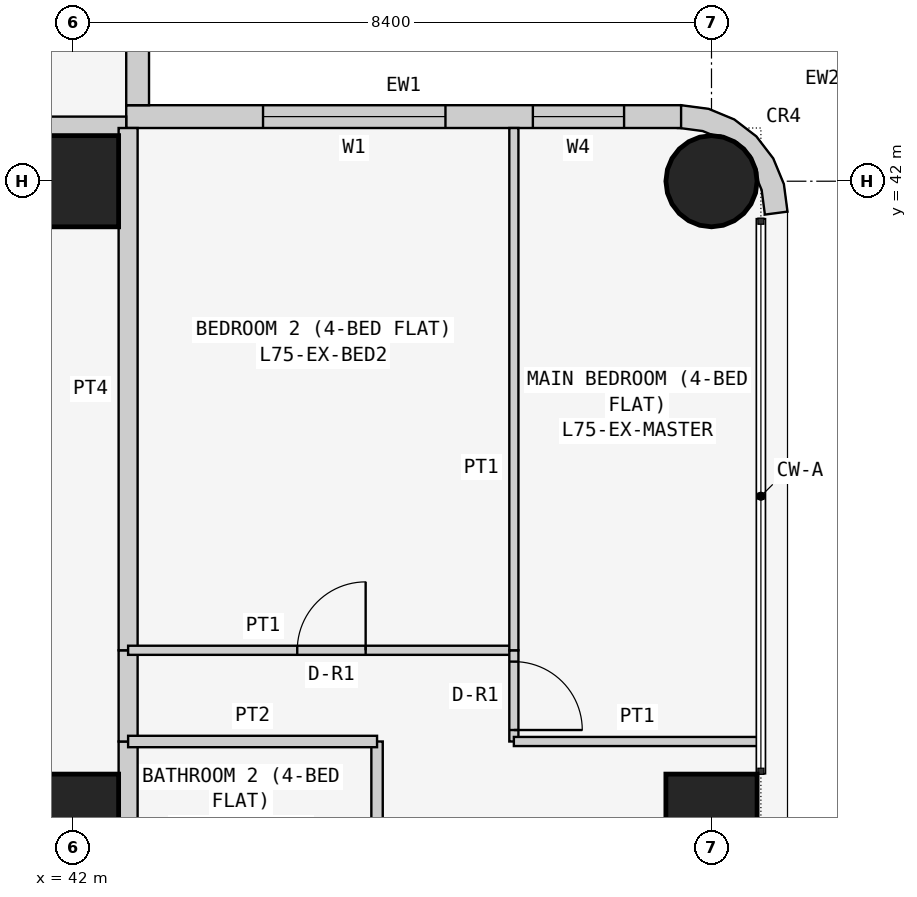
"""IFC4 building model, lengths in metres.
Left out: names, types, materials, properties, quantities, classifications, styles, units other than length and angle.
Written with IfcOpenShell. Run it as: python <this file> out.ifc"""

import sys

from ifc_helpers import new_model, si_unit, direction, frame, frame_2d, origin, origin_2d, place, context, subcontext, project, spatial, polyline, rectangle, circle, outline, extrude, element, fill, save


model = new_model("IFC4")
c1 = context("Model", 3, precision=1e-05, world=origin(), true_north=direction((0.0, 1.0)))
c2 = subcontext(c1, "Body", "Model", "MODEL_VIEW")
j1 = project(units=[si_unit("LENGTHUNIT", "METRE"), si_unit("PLANEANGLEUNIT", "RADIAN")], contexts=[c1])
p1 = place(None, origin())
s1 = spatial("IfcSite", under=j1, at=p1, CompositionType="ELEMENT")
p2 = place(p1, origin())
s2 = spatial("IfcBuilding", under=s1, at=p2, CompositionType="ELEMENT")
p3 = place(p2, frame((0.0, 0.0, 286.5)))
s3 = spatial("IfcBuildingStorey", under=s2, at=p3, CompositionType="ELEMENT", Elevation=286.5)
for number, where, z_axis, x_axis in (
    (1, (42.0, 33.6, 0.0), (0.0, 0.0, 1.0), (1.0, 0.0, 0.0)),
    (2, (42.0, 42.0, 0.0), (0.0, 0.0, 1.0), (1.0, 0.0, 0.0)),
    (3, (50.4, 33.6, 0.0), (0.0, 0.0, 1.0), (1.0, 0.0, 0.0)),
):
    element("IfcColumn", number, at=place(p3, frame(where, z_axis=z_axis, x_axis=x_axis)), inside=s3, PredefinedType="COLUMN", context=c2, shape_type="SweptSolid", body=[
        extrude(rectangle(XDim=1.2, YDim=1.2, at=origin_2d()), origin(), (0.0, 0.0, 1.0), 3.6),
    ])
p4 = place(p3, frame((50.4, 42.0, 0.0), z_axis=(0.0, 0.0, 1.0), x_axis=(1.0, 0.0, 0.0)))
e4 = element("IfcColumn", 4, at=p4, inside=s3, PredefinedType="COLUMN", context=c2, shape_type="SweptSolid", body=[
    extrude(circle(Radius=0.6, at=origin_2d()), origin(), (0.0, 0.0, 1.0), 3.6),
])
p5 = place(p3, frame((50.0, 42.85, 0.0), z_axis=(0.0, 0.0, 1.0), x_axis=(-1.0, 0.0, 0.0)))
e5 = element("IfcWall", 5, at=p5, inside=s3, PredefinedType="SOLIDWALL", context=c2, shape_type="SweptSolid", body=[
    extrude(rectangle(XDim=7.3, YDim=0.3, at=frame_2d((3.65, 0.0))), origin(), (0.0, 0.0, 1.0), 3.45),
])
p6 = place(p5, frame((3.1, 0.0, 0.9)))
e6 = element("IfcOpeningElement", 6, at=p6, cuts=e5, PredefinedType="OPENING", context=c2, shape_type="SweptSolid", body=[
    extrude(rectangle(XDim=2.4, YDim=1.5, at=frame_2d((1.2, 0.75))), frame((0.0, 0.16, 0.0), z_axis=(0.0, -1.0, 0.0), x_axis=(1.0, 0.0, 0.0)), (0.0, 0.0, 1.0), 0.32),
])
p7 = place(p5, frame((0.75, 0.0, 0.9)))
e7 = element("IfcOpeningElement", 7, at=p7, cuts=e5, PredefinedType="OPENING", context=c2, shape_type="SweptSolid", body=[
    extrude(rectangle(XDim=1.2, YDim=1.5, at=frame_2d((0.6, 0.75))), frame((0.0, 0.16, 0.0), z_axis=(0.0, -1.0, 0.0), x_axis=(1.0, 0.0, 0.0)), (0.0, 0.0, 1.0), 0.32),
])
p8 = place(p3, frame((42.85, 43.0, 0.0), z_axis=(0.0, 0.0, 1.0), x_axis=(0.0, 1.0, 0.0)))
e8 = element("IfcWall", 8, at=p8, inside=s3, PredefinedType="SOLIDWALL", context=c2, shape_type="SweptSolid", body=[
    extrude(rectangle(XDim=7.0, YDim=0.3, at=frame_2d((3.5, 0.0))), origin(), (0.0, 0.0, 1.0), 3.45),
])
p9 = place(p8, frame((1.5, 0.0, 0.9)))
e9 = element("IfcOpeningElement", 9, at=p9, cuts=e8, PredefinedType="OPENING", context=c2, shape_type="SweptSolid", body=[
    extrude(rectangle(XDim=2.4, YDim=1.5, at=frame_2d((1.2, 0.75))), frame((0.0, 0.16, 0.0), z_axis=(0.0, -1.0, 0.0), x_axis=(1.0, 0.0, 0.0)), (0.0, 0.0, 1.0), 0.32),
])
p10 = place(p8, frame((5.05, 0.0, 0.9)))
e10 = element("IfcOpeningElement", 10, at=p10, cuts=e8, PredefinedType="OPENING", context=c2, shape_type="SweptSolid", body=[
    extrude(rectangle(XDim=1.2, YDim=1.5, at=frame_2d((0.6, 0.75))), frame((0.0, 0.16, 0.0), z_axis=(0.0, -1.0, 0.0), x_axis=(1.0, 0.0, 0.0)), (0.0, 0.0, 1.0), 0.32),
])
p11 = place(p3, frame((50.976, 41.638, 0.0), z_axis=(0.0, 0.0, 1.0), x_axis=(0.707106781187, 0.707106781187, 0.0)))
e11 = element("IfcWall", 11, at=p11, inside=s3, PredefinedType="SOLIDWALL", context=c2, shape_type="SweptSolid", body=[
    extrude(outline(polyline([(0.233, 0.114), (0.047, -0.129), (0.033, -0.143), (0.273, -0.327), (0.495, -0.037), (0.635, 0.301), (0.683, 0.663), (0.635, 1.025), (0.495, 1.363), (0.273, 1.653), (0.033, 1.469), (0.047, 1.455), (0.233, 1.212), (0.292, 1.069), (0.358, 1.003), (0.449, 0.782), (0.449, 0.543), (0.358, 0.322), (0.292, 0.257), (0.233, 0.114)])), origin(), (0.0, 0.0, 1.0), 3.45),
])
p12 = place(p3, frame((35.829, 42.725, 0.0), z_axis=(0.0, 0.0, 1.0), x_axis=(1.0, 0.0, 0.0)))
e12 = element("IfcWall", 12, at=p12, inside=s3, PredefinedType="PARTITIONING", context=c2, shape_type="SweptSolid", body=[
    extrude(rectangle(XDim=6.871, YDim=0.25, at=frame_2d((3.436, 0.0))), origin(), (0.0, 0.0, 1.0), 3.45),
])
p13 = place(p3, frame((42.725, 34.629, 0.0), z_axis=(0.0, 0.0, 1.0), x_axis=(0.0, -1.0, 0.0)))
e13 = element("IfcWall", 13, at=p13, inside=s3, PredefinedType="PARTITIONING", context=c2, shape_type="SweptSolid", body=[
    extrude(rectangle(XDim=2.629, YDim=0.25, at=frame_2d((1.314, 0.0))), origin(), (0.0, 0.0, 1.0), 3.45),
])
p14 = place(p3, frame((42.725, 35.829, 0.0), z_axis=(0.0, 0.0, 1.0), x_axis=(0.0, -1.0, 0.0)))
e14 = element("IfcWall", 14, at=p14, inside=s3, PredefinedType="PARTITIONING", context=c2, shape_type="SweptSolid", body=[
    extrude(rectangle(XDim=1.2, YDim=0.25, at=frame_2d((0.6, 0.0))), origin(), (0.0, 0.0, 1.0), 3.45),
])
p15 = place(p3, frame((42.725, 42.7, 0.0), z_axis=(0.0, 0.0, 1.0), x_axis=(0.0, -1.0, 0.0)))
e15 = element("IfcWall", 15, at=p15, inside=s3, PredefinedType="PARTITIONING", context=c2, shape_type="SweptSolid", body=[
    extrude(rectangle(XDim=6.871, YDim=0.25, at=frame_2d((3.436, 0.0))), origin(), (0.0, 0.0, 1.0), 3.45),
])
p16 = place(p3, frame((46.0, 32.0, 0.0), z_axis=(0.0, 0.0, 1.0), x_axis=(0.0, 1.0, 0.0)))
e16 = element("IfcWall", 16, at=p16, inside=s3, PredefinedType="PARTITIONING", context=c2, shape_type="SweptSolid", body=[
    extrude(rectangle(XDim=2.629, YDim=0.15, at=frame_2d((1.314, 0.0))), origin(), (0.0, 0.0, 1.0), 3.45),
])
p17 = place(p3, frame((46.0, 34.629, 0.0), z_axis=(0.0, 0.0, 1.0), x_axis=(-1.0, 0.0, 0.0)))
e17 = element("IfcWall", 17, at=p17, inside=s3, PredefinedType="PARTITIONING", context=c2, shape_type="SweptSolid", body=[
    extrude(rectangle(XDim=3.275, YDim=0.15, at=frame_2d((1.637, 0.0))), origin(), (0.0, 0.0, 1.0), 3.45),
])
p18 = place(p3, frame((42.725, 35.829, 0.0), z_axis=(0.0, 0.0, 1.0), x_axis=(1.0, 0.0, 0.0)))
e18 = element("IfcWall", 18, at=p18, inside=s3, PredefinedType="PARTITIONING", context=c2, shape_type="SweptSolid", body=[
    extrude(rectangle(XDim=5.075, YDim=0.12, at=frame_2d((2.538, 0.0))), origin(), (0.0, 0.0, 1.0), 3.45),
])
p19 = place(p18, frame((2.225, 0.0, 0.0)))
e19 = element("IfcOpeningElement", 19, at=p19, cuts=e18, PredefinedType="OPENING", context=c2, shape_type="SweptSolid", body=[
    extrude(rectangle(XDim=0.9, YDim=2.1, at=frame_2d((0.45, 1.05))), frame((0.0, 0.07, 0.0), z_axis=(0.0, -1.0, 0.0), x_axis=(1.0, 0.0, 0.0)), (0.0, 0.0, 1.0), 0.14),
])
p20 = place(p3, frame((47.8, 35.829, 0.0), z_axis=(0.0, 0.0, 1.0), x_axis=(0.0, -1.0, 0.0)))
e20 = element("IfcWall", 20, at=p20, inside=s3, PredefinedType="PARTITIONING", context=c2, shape_type="SweptSolid", body=[
    extrude(rectangle(XDim=1.2, YDim=0.12, at=frame_2d((0.6, 0.0))), origin(), (0.0, 0.0, 1.0), 3.45),
])
p21 = place(p20, frame((0.149, 0.0, 0.0)))
e21 = element("IfcOpeningElement", 21, at=p21, cuts=e20, PredefinedType="OPENING", context=c2, shape_type="SweptSolid", body=[
    extrude(rectangle(XDim=0.9, YDim=2.1, at=frame_2d((0.45, 1.05))), frame((0.0, 0.07, 0.0), z_axis=(0.0, -1.0, 0.0), x_axis=(1.0, 0.0, 0.0)), (0.0, 0.0, 1.0), 0.14),
])
p22 = place(p3, frame((47.8, 34.629, 0.0), z_axis=(0.0, 0.0, 1.0), x_axis=(1.0, 0.0, 0.0)))
e22 = element("IfcWall", 22, at=p22, inside=s3, PredefinedType="PARTITIONING", context=c2, shape_type="SweptSolid", body=[
    extrude(rectangle(XDim=3.25, YDim=0.12, at=frame_2d((1.625, 0.0))), origin(), (0.0, 0.0, 1.0), 3.45),
])
p23 = place(p3, frame((47.8, 35.829, 0.0), z_axis=(0.0, 0.0, 1.0), x_axis=(0.0, 1.0, 0.0)))
e23 = element("IfcWall", 23, at=p23, inside=s3, PredefinedType="PARTITIONING", context=c2, shape_type="SweptSolid", body=[
    extrude(rectangle(XDim=6.871, YDim=0.12, at=frame_2d((3.436, 0.0))), origin(), (0.0, 0.0, 1.0), 3.45),
])
p24 = place(p6, origin())
e24 = element("IfcWindow", 24, at=p24, inside=s3, PartitioningType="SINGLE_PANEL", PredefinedType="WINDOW", context=c2, shape_type="SweptSolid", body=[
    extrude(rectangle(XDim=2.4, YDim=1.5, at=frame_2d((1.2, 0.75))), frame((0.0, 0.03, 0.0), z_axis=(0.0, -1.0, 0.0), x_axis=(1.0, 0.0, 0.0)), (0.0, 0.0, 1.0), 0.06),
])
fill(e6, e24)
p25 = place(p7, origin())
e25 = element("IfcWindow", 25, at=p25, inside=s3, PartitioningType="SINGLE_PANEL", PredefinedType="WINDOW", context=c2, shape_type="SweptSolid", body=[
    extrude(rectangle(XDim=1.2, YDim=1.5, at=frame_2d((0.6, 0.75))), frame((0.0, 0.03, 0.0), z_axis=(0.0, -1.0, 0.0), x_axis=(1.0, 0.0, 0.0)), (0.0, 0.0, 1.0), 0.06),
])
fill(e7, e25)
p26 = place(p19, origin())
e26 = element("IfcDoor", 26, at=p26, inside=s3, OperationType="SINGLE_SWING_RIGHT", PredefinedType="DOOR", context=c2, shape_type="SweptSolid", body=[
    extrude(rectangle(XDim=0.9, YDim=2.1, at=frame_2d((0.45, 1.05))), frame((0.0, 0.025, 0.0), z_axis=(0.0, -1.0, 0.0), x_axis=(1.0, 0.0, 0.0)), (0.0, 0.0, 1.0), 0.05),
])
fill(e19, e26)
p27 = place(p21, origin())
e27 = element("IfcDoor", 27, at=p27, inside=s3, OperationType="SINGLE_SWING_RIGHT", PredefinedType="DOOR", context=c2, shape_type="SweptSolid", body=[
    extrude(rectangle(XDim=0.9, YDim=2.1, at=frame_2d((0.45, 1.05))), frame((0.0, 0.025, 0.0), z_axis=(0.0, -1.0, 0.0), x_axis=(1.0, 0.0, 0.0)), (0.0, 0.0, 1.0), 0.05),
])
fill(e21, e27)
save(model, sys.argv[1])
